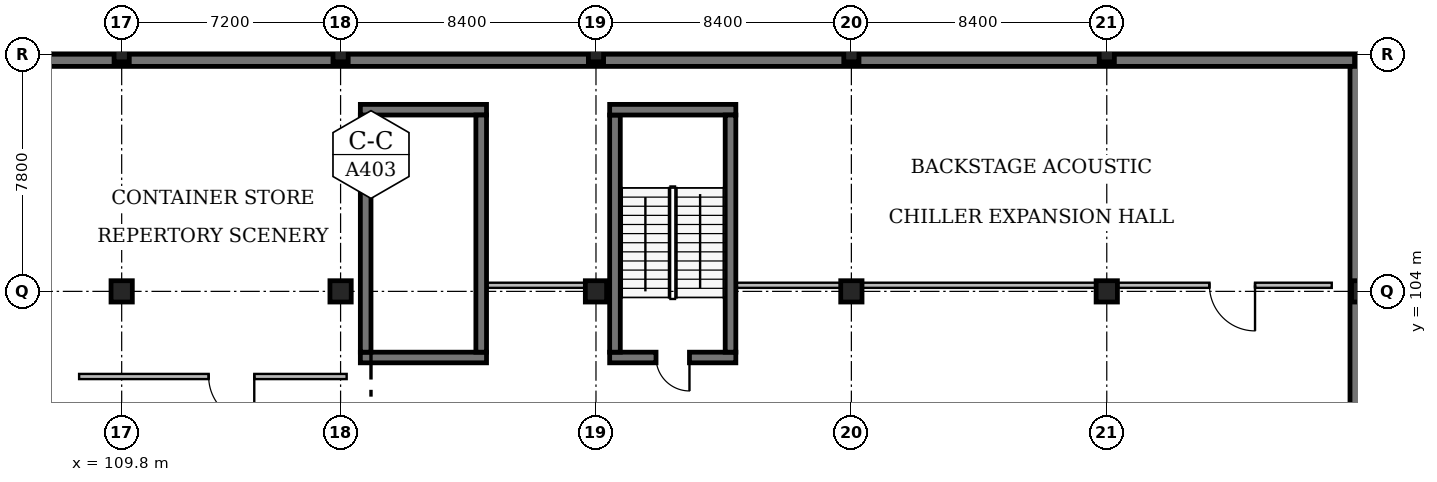
"""IFC4 building model, lengths in metres.
Left out: names, types, materials, properties, quantities, classifications, styles, units other than length and angle.
Written with IfcOpenShell. Run it as: python <this file> out.ifc"""

import sys

from ifc_helpers import new_model, si_unit, direction, frame, frame_2d, origin, origin_2d, place, context, subcontext, project, spatial, rectangle, extrude, element, fill, save


model = new_model("IFC4")
c1 = context("Model", 3, precision=1e-05, world=origin(), true_north=direction((0.0, 1.0)))
c2 = subcontext(c1, "Body", "Model", "MODEL_VIEW")
j1 = project(units=[si_unit("LENGTHUNIT", "METRE"), si_unit("PLANEANGLEUNIT", "RADIAN")], contexts=[c1])
p1 = place(None, origin())
s1 = spatial("IfcSite", under=j1, at=p1, CompositionType="ELEMENT")
p2 = place(p1, origin())
s2 = spatial("IfcBuilding", under=s1, at=p2, CompositionType="ELEMENT")
p3 = place(p2, frame((0.0, 0.0, -4.8)))
s3 = spatial("IfcBuildingStorey", under=s2, at=p3, CompositionType="ELEMENT", Elevation=-4.8)
p4 = place(p3, frame((109.8, 104.0, 0.0), z_axis=(0.0, 0.0, 1.0), x_axis=(1.0, 0.0, 0.0)))
e1 = element("IfcColumn", 1, at=p4, inside=s3, PredefinedType="COLUMN", context=c2, shape_type="SweptSolid", body=[
    extrude(rectangle(XDim=0.7, YDim=0.7, at=origin_2d()), origin(), (0.0, 0.0, 1.0), 4.8),
])
p5 = place(p3, frame((109.8, 111.8, 0.0), z_axis=(0.0, 0.0, 1.0), x_axis=(1.0, 0.0, 0.0)))
e2 = element("IfcColumn", 2, at=p5, inside=s3, PredefinedType="COLUMN", context=c2, shape_type="SweptSolid", body=[
    extrude(rectangle(XDim=0.5, YDim=0.5, at=origin_2d()), origin(), (0.0, 0.0, 1.0), 4.8),
])
p6 = place(p3, frame((117.0, 104.0, 0.0), z_axis=(0.0, 0.0, 1.0), x_axis=(1.0, 0.0, 0.0)))
e3 = element("IfcColumn", 3, at=p6, inside=s3, PredefinedType="COLUMN", context=c2, shape_type="SweptSolid", body=[
    extrude(rectangle(XDim=0.7, YDim=0.7, at=origin_2d()), origin(), (0.0, 0.0, 1.0), 4.8),
])
p7 = place(p3, frame((117.0, 111.8, 0.0), z_axis=(0.0, 0.0, 1.0), x_axis=(1.0, 0.0, 0.0)))
e4 = element("IfcColumn", 4, at=p7, inside=s3, PredefinedType="COLUMN", context=c2, shape_type="SweptSolid", body=[
    extrude(rectangle(XDim=0.5, YDim=0.5, at=origin_2d()), origin(), (0.0, 0.0, 1.0), 4.8),
])
p8 = place(p3, frame((125.4, 104.0, 0.0), z_axis=(0.0, 0.0, 1.0), x_axis=(1.0, 0.0, 0.0)))
e5 = element("IfcColumn", 5, at=p8, inside=s3, PredefinedType="COLUMN", context=c2, shape_type="SweptSolid", body=[
    extrude(rectangle(XDim=0.7, YDim=0.7, at=origin_2d()), origin(), (0.0, 0.0, 1.0), 4.8),
])
p9 = place(p3, frame((125.4, 111.8, 0.0), z_axis=(0.0, 0.0, 1.0), x_axis=(1.0, 0.0, 0.0)))
e6 = element("IfcColumn", 6, at=p9, inside=s3, PredefinedType="COLUMN", context=c2, shape_type="SweptSolid", body=[
    extrude(rectangle(XDim=0.5, YDim=0.5, at=origin_2d()), origin(), (0.0, 0.0, 1.0), 4.8),
])
p10 = place(p3, frame((133.8, 104.0, 0.0), z_axis=(0.0, 0.0, 1.0), x_axis=(1.0, 0.0, 0.0)))
e7 = element("IfcColumn", 7, at=p10, inside=s3, PredefinedType="COLUMN", context=c2, shape_type="SweptSolid", body=[
    extrude(rectangle(XDim=0.7, YDim=0.7, at=origin_2d()), origin(), (0.0, 0.0, 1.0), 4.8),
])
p11 = place(p3, frame((133.8, 111.8, 0.0), z_axis=(0.0, 0.0, 1.0), x_axis=(1.0, 0.0, 0.0)))
e8 = element("IfcColumn", 8, at=p11, inside=s3, PredefinedType="COLUMN", context=c2, shape_type="SweptSolid", body=[
    extrude(rectangle(XDim=0.5, YDim=0.5, at=origin_2d()), origin(), (0.0, 0.0, 1.0), 4.8),
])
p12 = place(p3, frame((142.2, 104.0, 0.0), z_axis=(0.0, 0.0, 1.0), x_axis=(1.0, 0.0, 0.0)))
e9 = element("IfcColumn", 9, at=p12, inside=s3, PredefinedType="COLUMN", context=c2, shape_type="SweptSolid", body=[
    extrude(rectangle(XDim=0.7, YDim=0.7, at=origin_2d()), origin(), (0.0, 0.0, 1.0), 4.8),
])
p13 = place(p3, frame((142.2, 111.8, 0.0), z_axis=(0.0, 0.0, 1.0), x_axis=(1.0, 0.0, 0.0)))
e10 = element("IfcColumn", 10, at=p13, inside=s3, PredefinedType="COLUMN", context=c2, shape_type="SweptSolid", body=[
    extrude(rectangle(XDim=0.5, YDim=0.5, at=origin_2d()), origin(), (0.0, 0.0, 1.0), 4.8),
])
p14 = place(p3, frame((150.6, 104.0, 0.0), z_axis=(0.0, 0.0, 1.0), x_axis=(1.0, 0.0, 0.0)))
e11 = element("IfcColumn", 11, at=p14, inside=s3, PredefinedType="COLUMN", context=c2, shape_type="SweptSolid", body=[
    extrude(rectangle(XDim=0.7, YDim=0.7, at=origin_2d()), origin(), (0.0, 0.0, 1.0), 4.8),
])
p15 = place(p3, frame((150.6, 111.8, 0.0), z_axis=(0.0, 0.0, 1.0), x_axis=(1.0, 0.0, 0.0)))
e12 = element("IfcColumn", 12, at=p15, inside=s3, PredefinedType="COLUMN", context=c2, shape_type="SweptSolid", body=[
    extrude(rectangle(XDim=0.5, YDim=0.5, at=origin_2d()), origin(), (0.0, 0.0, 1.0), 4.8),
])
p16 = place(p3, frame((121.8, 101.825, 0.0), z_axis=(0.0, 0.0, 1.0), x_axis=(-1.0, 0.0, 0.0)))
e13 = element("IfcWall", 13, at=p16, inside=s3, PredefinedType="SOLIDWALL", context=c2, shape_type="SweptSolid", body=[
    extrude(rectangle(XDim=4.15, YDim=0.35, at=frame_2d((2.075, 0.0))), origin(), (0.0, 0.0, 1.0), 4.48),
])
p17 = place(p3, frame((117.825, 102.0, 0.0), z_axis=(0.0, 0.0, 1.0), x_axis=(0.0, 1.0, 0.0)))
e14 = element("IfcWall", 14, at=p17, inside=s3, PredefinedType="SOLIDWALL", context=c2, shape_type="SweptSolid", body=[
    extrude(rectangle(XDim=7.8, YDim=0.35, at=frame_2d((3.9, 0.0))), origin(), (0.0, 0.0, 1.0), 4.48),
])
p18 = place(p3, frame((117.65, 109.975, 0.0), z_axis=(0.0, 0.0, 1.0), x_axis=(1.0, 0.0, 0.0)))
e15 = element("IfcWall", 15, at=p18, inside=s3, PredefinedType="SOLIDWALL", context=c2, shape_type="SweptSolid", body=[
    extrude(rectangle(XDim=4.15, YDim=0.35, at=frame_2d((2.075, 0.0))), origin(), (0.0, 0.0, 1.0), 4.48),
])
p19 = place(p3, frame((121.625, 109.8, 0.0), z_axis=(0.0, 0.0, 1.0), x_axis=(0.0, -1.0, 0.0)))
e16 = element("IfcWall", 16, at=p19, inside=s3, PredefinedType="SOLIDWALL", context=c2, shape_type="SweptSolid", body=[
    extrude(rectangle(XDim=7.8, YDim=0.35, at=frame_2d((3.9, 0.0))), origin(), (0.0, 0.0, 1.0), 4.48),
])
p20 = place(p3, frame((130.0, 101.825, 0.0), z_axis=(0.0, 0.0, 1.0), x_axis=(-1.0, 0.0, 0.0)))
e17 = element("IfcWall", 17, at=p20, inside=s3, PredefinedType="SOLIDWALL", context=c2, shape_type="SweptSolid", body=[
    extrude(rectangle(XDim=4.15, YDim=0.35, at=frame_2d((2.075, 0.0))), origin(), (0.0, 0.0, 1.0), 4.56),
])
p21 = place(p20, frame((1.525, 0.0, 0.0)))
e18 = element("IfcOpeningElement", 18, at=p21, cuts=e17, PredefinedType="OPENING", context=c2, shape_type="SweptSolid", body=[
    extrude(rectangle(XDim=1.1, YDim=2.15, at=frame_2d((0.55, 1.075))), frame((0.0, 0.195, 0.0), z_axis=(0.0, -1.0, 0.0), x_axis=(1.0, 0.0, 0.0)), (0.0, 0.0, 1.0), 0.39),
])
p22 = place(p3, frame((126.025, 102.0, 0.0), z_axis=(0.0, 0.0, 1.0), x_axis=(0.0, 1.0, 0.0)))
e19 = element("IfcWall", 19, at=p22, inside=s3, PredefinedType="SOLIDWALL", context=c2, shape_type="SweptSolid", body=[
    extrude(rectangle(XDim=7.8, YDim=0.35, at=frame_2d((3.9, 0.0))), origin(), (0.0, 0.0, 1.0), 4.56),
])
p23 = place(p3, frame((125.85, 109.975, 0.0), z_axis=(0.0, 0.0, 1.0), x_axis=(1.0, 0.0, 0.0)))
e20 = element("IfcWall", 20, at=p23, inside=s3, PredefinedType="SOLIDWALL", context=c2, shape_type="SweptSolid", body=[
    extrude(rectangle(XDim=4.15, YDim=0.35, at=frame_2d((2.075, 0.0))), origin(), (0.0, 0.0, 1.0), 4.56),
])
p24 = place(p3, frame((129.825, 109.8, 0.0), z_axis=(0.0, 0.0, 1.0), x_axis=(0.0, -1.0, 0.0)))
e21 = element("IfcWall", 21, at=p24, inside=s3, PredefinedType="SOLIDWALL", context=c2, shape_type="SweptSolid", body=[
    extrude(rectangle(XDim=7.8, YDim=0.35, at=frame_2d((3.9, 0.0))), origin(), (0.0, 0.0, 1.0), 4.56),
])
p25 = place(p3, frame((57.6, 111.6, 0.0), z_axis=(0.0, 0.0, 1.0), x_axis=(1.0, 0.0, 0.0)))
e22 = element("IfcWall", 22, at=p25, inside=s3, PredefinedType="SOLIDWALL", context=c2, shape_type="SweptSolid", body=[
    extrude(rectangle(XDim=93.0, YDim=0.4, at=frame_2d((46.5, 0.0))), origin(), (0.0, 0.0, 1.0), 4.48),
])
p26 = place(p3, frame((150.4, 88.2, 0.0), z_axis=(0.0, 0.0, 1.0), x_axis=(0.0, 1.0, 0.0)))
e23 = element("IfcWall", 23, at=p26, inside=s3, PredefinedType="SOLIDWALL", context=c2, shape_type="SweptSolid", body=[
    extrude(rectangle(XDim=23.2, YDim=0.4, at=frame_2d((11.6, 0.0))), origin(), (0.0, 0.0, 1.0), 4.48),
])
p27 = place(p3, frame((117.2, 101.2, 0.0), z_axis=(0.0, 0.0, 1.0), x_axis=(-1.0, 0.0, 0.0)))
e24 = element("IfcWall", 24, at=p27, inside=s3, PredefinedType="PARTITIONING", context=c2, shape_type="SweptSolid", body=[
    extrude(rectangle(XDim=8.8, YDim=0.17, at=frame_2d((4.4, 0.0))), origin(), (0.0, 0.0, 1.0), 4.48),
])
p28 = place(p27, frame((3.039, 0.0, 0.0)))
e25 = element("IfcOpeningElement", 25, at=p28, cuts=e24, PredefinedType="OPENING", context=c2, shape_type="SweptSolid", body=[
    extrude(rectangle(XDim=1.5, YDim=2.2, at=frame_2d((0.75, 1.1))), frame((0.0, 0.105, 0.0), z_axis=(0.0, -1.0, 0.0), x_axis=(1.0, 0.0, 0.0)), (0.0, 0.0, 1.0), 0.21),
])
p29 = place(p3, frame((149.6, 104.2, 0.0), z_axis=(0.0, 0.0, 1.0), x_axis=(-1.0, 0.0, 0.0)))
e26 = element("IfcWall", 26, at=p29, inside=s3, PredefinedType="PARTITIONING", context=c2, shape_type="SweptSolid", body=[
    extrude(rectangle(XDim=7.03, YDim=0.17, at=frame_2d((3.515, 0.0))), origin(), (0.0, 0.0, 1.0), 3.75),
])
p30 = place(p29, frame((2.523, 0.0, 0.0)))
e27 = element("IfcOpeningElement", 27, at=p30, cuts=e26, PredefinedType="OPENING", context=c2, shape_type="SweptSolid", body=[
    extrude(rectangle(XDim=1.5, YDim=2.2, at=frame_2d((0.75, 1.1))), frame((0.0, 0.105, 0.0), z_axis=(0.0, -1.0, 0.0), x_axis=(1.0, 0.0, 0.0)), (0.0, 0.0, 1.0), 0.21),
])
p31 = place(p3, frame((141.83, 104.2, 0.0), z_axis=(0.0, 0.0, 1.0), x_axis=(-1.0, 0.0, 0.0)))
e28 = element("IfcWall", 28, at=p31, inside=s3, PredefinedType="PARTITIONING", context=c2, shape_type="SweptSolid", body=[
    extrude(rectangle(XDim=7.66, YDim=0.17, at=frame_2d((3.83, 0.0))), origin(), (0.0, 0.0, 1.0), 3.75),
])
p32 = place(p3, frame((133.43, 104.2, 0.0), z_axis=(0.0, 0.0, 1.0), x_axis=(-1.0, 0.0, 0.0)))
e29 = element("IfcWall", 29, at=p32, inside=s3, PredefinedType="PARTITIONING", context=c2, shape_type="SweptSolid", body=[
    extrude(rectangle(XDim=3.39, YDim=0.17, at=frame_2d((1.695, 0.0))), origin(), (0.0, 0.0, 1.0), 4.48),
])
p33 = place(p3, frame((125.03, 104.2, 0.0), z_axis=(0.0, 0.0, 1.0), x_axis=(-1.0, 0.0, 0.0)))
e30 = element("IfcWall", 30, at=p33, inside=s3, PredefinedType="PARTITIONING", context=c2, shape_type="SweptSolid", body=[
    extrude(rectangle(XDim=3.19, YDim=0.17, at=frame_2d((1.595, 0.0))), origin(), (0.0, 0.0, 1.0), 4.48),
])
p34 = place(p21, origin())
e31 = element("IfcDoor", 31, at=p34, inside=s3, OperationType="SINGLE_SWING_LEFT", PredefinedType="DOOR", context=c2, shape_type="SweptSolid", body=[
    extrude(rectangle(XDim=1.1, YDim=2.15, at=frame_2d((0.55, 1.075))), frame((0.0, 0.025, 0.0), z_axis=(0.0, -1.0, 0.0), x_axis=(1.0, 0.0, 0.0)), (0.0, 0.0, 1.0), 0.05),
])
fill(e18, e31)
p35 = place(p28, origin())
e32 = element("IfcDoor", 32, at=p35, inside=s3, OperationType="DOUBLE_DOOR_SINGLE_SWING", PredefinedType="DOOR", context=c2, shape_type="SweptSolid", body=[
    extrude(rectangle(XDim=1.5, YDim=2.2, at=frame_2d((0.75, 1.1))), frame((0.0, 0.025, 0.0), z_axis=(0.0, -1.0, 0.0), x_axis=(1.0, 0.0, 0.0)), (0.0, 0.0, 1.0), 0.05),
])
fill(e25, e32)
p36 = place(p30, origin())
e33 = element("IfcDoor", 33, at=p36, inside=s3, OperationType="DOUBLE_DOOR_SINGLE_SWING", PredefinedType="DOOR", context=c2, shape_type="SweptSolid", body=[
    extrude(rectangle(XDim=1.5, YDim=2.2, at=frame_2d((0.75, 1.1))), frame((0.0, 0.025, 0.0), z_axis=(0.0, -1.0, 0.0), x_axis=(1.0, 0.0, 0.0)), (0.0, 0.0, 1.0), 0.05),
])
fill(e27, e33)
save(model, sys.argv[1])
